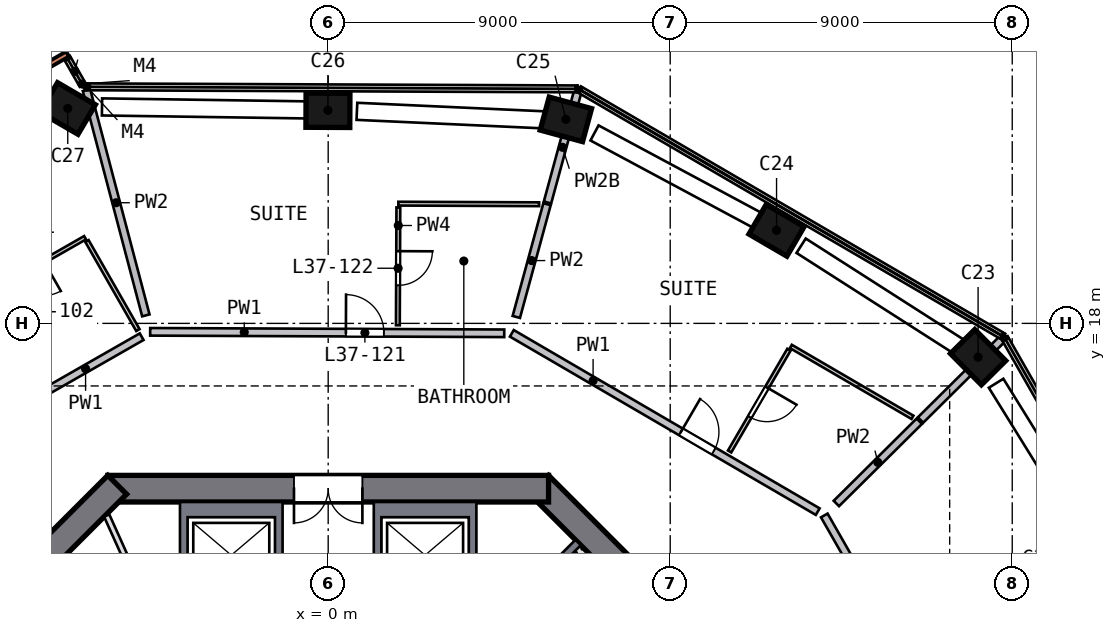
"""IFC4 building model, lengths in metres.
Left out: names, types, materials, properties, quantities, classifications, styles, units other than length and angle.
Written with IfcOpenShell. Run it as: python <this file> out.ifc"""

import sys

from ifc_helpers import new_model, si_unit, direction, frame, frame_2d, origin, origin_2d, place, context, subcontext, project, spatial, polyline, rectangle, outline, extrude, element, fill, save


model = new_model("IFC4")
c1 = context("Model", 3, precision=1e-05, world=origin(), true_north=direction((0.0, 1.0)))
c2 = subcontext(c1, "Body", "Model", "MODEL_VIEW")
j1 = project(units=[si_unit("LENGTHUNIT", "METRE"), si_unit("PLANEANGLEUNIT", "RADIAN")], contexts=[c1])
p1 = place(None, origin())
s1 = spatial("IfcSite", under=j1, at=p1, CompositionType="ELEMENT")
p2 = place(p1, origin())
s2 = spatial("IfcBuilding", under=s1, at=p2, CompositionType="ELEMENT")
p3 = place(p2, frame((0.0, 0.0, 154.0)))
s3 = spatial("IfcBuildingStorey", under=s2, at=p3, CompositionType="ELEMENT", Elevation=154.0)
p4 = place(p3, frame((17.178, 17.035, 0.0), z_axis=(-0.063662588, 0.063198321, 0.995968397), x_axis=(0.700878187, -0.707618105, 0.089701637)))
e1 = element("IfcColumn", 1, at=p4, inside=s3, PredefinedType="COLUMN", context=c2, shape_type="SweptSolid", body=[
    extrude(rectangle(XDim=1.15, YDim=0.9, at=origin_2d()), origin(), (0.0, 0.0, 1.0), 4.207),
])
p5 = place(p3, frame((11.89, 20.396, 0.0), z_axis=(-0.075980354, 0.04347539, 0.996161069), x_axis=(-0.860417708, 0.502014727, -0.087536174)))
e2 = element("IfcColumn", 2, at=p5, inside=s3, PredefinedType="COLUMN", context=c2, shape_type="SweptSolid", body=[
    extrude(rectangle(XDim=1.15, YDim=0.9, at=origin_2d()), origin(), (0.0, 0.0, 1.0), 4.206),
])
p6 = place(p3, frame((6.359, 23.342, 0.0), z_axis=(-0.086759726, 0.022865105, 0.995966835), x_axis=(0.960904851, -0.261939638, 0.08971897)))
e3 = element("IfcColumn", 3, at=p6, inside=s3, PredefinedType="COLUMN", context=c2, shape_type="SweptSolid", body=[
    extrude(rectangle(XDim=1.15, YDim=0.9, at=origin_2d()), origin(), (0.0, 0.0, 1.0), 4.207),
])
p7 = place(p3, frame((0.099, 23.608, 0.0), z_axis=(-0.087531282, -0.000348268, 0.99616171), x_axis=(-0.996152055, 0.004447239, -0.087528879)))
e4 = element("IfcColumn", 4, at=p7, inside=s3, PredefinedType="COLUMN", context=c2, shape_type="SweptSolid", body=[
    extrude(rectangle(XDim=1.15, YDim=0.9, at=origin_2d()), origin(), (0.0, 0.0, 1.0), 4.206),
])
p8 = place(p3, frame((-6.747, 23.687, 0.0), z_axis=(-0.087617394, -0.025762995, 0.995820998), x_axis=(0.860171436, -0.50615007, 0.062587591)))
e5 = element("IfcColumn", 5, at=p8, inside=s3, PredefinedType="COLUMN", context=c2, shape_type="SweptSolid", body=[
    extrude(rectangle(XDim=1.15, YDim=0.9, at=origin_2d()), origin(), (0.0, 0.0, 1.0), 4.208),
])
p9 = place(p3, frame((13.752, 5.552, 0.0), z_axis=(0.0, 0.0, 1.0), x_axis=(-0.707106781, 0.707106781, 0.0)))
e6 = element("IfcWall", 6, at=p9, inside=s3, PredefinedType="SHEAR", context=c2, shape_type="SweptSolid", body=[
    extrude(rectangle(XDim=11.598, YDim=0.7, at=frame_2d((5.799, 0.0))), origin(), (0.0, 0.0, 1.0), 4.5),
])
p10 = place(p9, frame((2.099, 0.0, 0.0)))
e7 = element("IfcOpeningElement", 7, at=p10, cuts=e6, PredefinedType="OPENING", context=c2, shape_type="SweptSolid", body=[
    extrude(rectangle(XDim=1.2, YDim=2.1, at=frame_2d((0.6, 1.05))), frame((0.0, 0.36, 0.0), z_axis=(0.0, -1.0, 0.0), x_axis=(1.0, 0.0, 0.0)), (0.0, 0.0, 1.0), 0.72),
])
p11 = place(p3, frame((5.799, 13.65, 0.0), z_axis=(0.0, 0.0, 1.0), x_axis=(-1.0, 0.0, 0.0)))
e8 = element("IfcWall", 8, at=p11, inside=s3, PredefinedType="SHEAR", context=c2, shape_type="SweptSolid", body=[
    extrude(rectangle(XDim=11.598, YDim=0.7, at=frame_2d((5.799, 0.0))), origin(), (0.0, 0.0, 1.0), 4.5),
])
p12 = place(p11, frame((4.899, 0.0, 0.0)))
e9 = element("IfcOpeningElement", 9, at=p12, cuts=e8, PredefinedType="OPENING", context=c2, shape_type="SweptSolid", body=[
    extrude(rectangle(XDim=1.8, YDim=2.1, at=frame_2d((0.9, 1.05))), frame((0.0, 0.36, 0.0), z_axis=(0.0, -1.0, 0.0), x_axis=(1.0, 0.0, 0.0)), (0.0, 0.0, 1.0), 0.72),
])
p13 = place(p3, frame((-5.552, 13.752, 0.0), z_axis=(0.0, 0.0, 1.0), x_axis=(-0.707106781, -0.707106781, 0.0)))
e10 = element("IfcWall", 10, at=p13, inside=s3, PredefinedType="SHEAR", context=c2, shape_type="SweptSolid", body=[
    extrude(rectangle(XDim=11.598, YDim=0.7, at=frame_2d((5.799, 0.0))), origin(), (0.0, 0.0, 1.0), 4.5),
])
p14 = place(p3, frame((-6.857, 25.088, 0.0), z_axis=(0.0, 0.0, 1.0), x_axis=(-0.868114906, -0.496363285, 0.0)))
e11 = element("IfcWall", 11, at=p14, inside=s3, PredefinedType="SOLIDWALL", context=c2, shape_type="SweptSolid", body=[
    extrude(rectangle(XDim=1.875, YDim=0.15, at=frame_2d((0.938, 0.0))), origin(), (0.0, 0.0, 1.0), 4.19),
])
p15 = place(p3, origin())
e12 = element("IfcWall", 12, at=p15, inside=s3, PredefinedType="SOLIDWALL", context=c2, shape_type="SweptSolid", body=[
    extrude(outline(polyline([(3.9, 13.3), (3.9, 10.9), (3.7, 10.9), (3.7, 12.9), (1.4, 12.9), (1.4, 10.9), (1.2, 10.9), (1.2, 13.3), (3.9, 13.3)])), origin(), (0.0, 0.0, 1.0), 4.19),
])
p16 = place(p3, origin())
e13 = element("IfcWall", 13, at=p16, inside=s3, PredefinedType="SOLIDWALL", context=c2, shape_type="SweptSolid", body=[
    extrude(outline(polyline([(-3.9, 10.9), (-3.9, 13.3), (-1.2, 13.3), (-1.2, 10.9), (-1.4, 10.9), (-1.4, 12.9), (-3.7, 12.9), (-3.7, 10.9), (-3.9, 10.9)])), origin(), (0.0, 0.0, 1.0), 4.19),
])
p17 = place(p3, frame((3.677, 9.334, 0.0), z_axis=(0.0, 0.0, 1.0), x_axis=(0.707106781, 0.707106781, 0.0)))
e14 = element("IfcWall", 14, at=p17, inside=s3, PredefinedType="SOLIDWALL", context=c2, shape_type="SweptSolid", body=[
    extrude(rectangle(XDim=4.1, YDim=0.2, at=frame_2d((2.05, 0.0))), origin(), (0.0, 0.0, 1.0), 4.19),
])
p18 = place(p3, frame((-5.828, 12.942, 0.0), z_axis=(0.0, 0.0, 1.0), x_axis=(0.410577476, -0.911825716, 0.0)))
e15 = element("IfcWall", 15, at=p18, inside=s3, PredefinedType="PARTITIONING", context=c2, shape_type="SweptSolid", body=[
    extrude(rectangle(XDim=9.063, YDim=0.15, at=frame_2d((4.532, 0.0))), origin(), (0.0, 0.0, 1.0), 4.19),
])
p19 = place(p18, frame((3.463, 0.0, 0.0)))
e16 = element("IfcOpeningElement", 16, at=p19, cuts=e15, PredefinedType="OPENING", context=c2, shape_type="SweptSolid", body=[
    extrude(rectangle(XDim=1.8, YDim=2.1, at=frame_2d((0.9, 1.05))), frame((0.0, 0.085, 0.0), z_axis=(0.0, -1.0, 0.0), x_axis=(1.0, 0.0, 0.0)), (0.0, 0.0, 1.0), 0.17),
])
p20 = place(p3, frame((-4.908, 17.65, 0.0), z_axis=(0.0, 0.0, 1.0), x_axis=(-0.86811938, -0.49635546, 0.0)))
e17 = element("IfcWall", 17, at=p20, inside=s3, PredefinedType="SOLIDWALL", context=c2, shape_type="SweptSolid", body=[
    extrude(rectangle(XDim=3.4, YDim=0.2, at=frame_2d((1.7, 0.0))), origin(), (0.0, 0.0, 1.0), 4.19),
])
p21 = place(p3, frame((-4.684, 17.778, 0.0), z_axis=(0.0, 0.0, 1.0), x_axis=(0.99999121, -0.004192835, 0.0)))
e18 = element("IfcWall", 18, at=p21, inside=s3, PredefinedType="SOLIDWALL", context=c2, shape_type="SweptSolid", body=[
    extrude(rectangle(XDim=9.316, YDim=0.2, at=frame_2d((4.658, 0.0))), origin(), (0.0, 0.0, 1.0), 4.19),
])
p22 = place(p21, frame((5.15, 0.0, 0.0)))
e19 = element("IfcOpeningElement", 19, at=p22, cuts=e18, PredefinedType="OPENING", context=c2, shape_type="SweptSolid", body=[
    extrude(rectangle(XDim=1.0, YDim=2.1, at=frame_2d((0.5, 1.05))), frame((0.0, 0.11, 0.0), z_axis=(0.0, -1.0, 0.0), x_axis=(1.0, 0.0, 0.0)), (0.0, 0.0, 1.0), 0.22),
])
p23 = place(p3, frame((4.833, 17.738, 0.0), z_axis=(0.0, 0.0, 1.0), x_axis=(0.863919531, -0.503629868, 0.0)))
e20 = element("IfcWall", 20, at=p23, inside=s3, PredefinedType="SOLIDWALL", context=c2, shape_type="SweptSolid", body=[
    extrude(rectangle(XDim=9.317, YDim=0.2, at=frame_2d((4.658, 0.0))), origin(), (0.0, 0.0, 1.0), 4.19),
])
p24 = place(p23, frame((5.15, 0.0, 0.0)))
e21 = element("IfcOpeningElement", 21, at=p24, cuts=e20, PredefinedType="OPENING", context=c2, shape_type="SweptSolid", body=[
    extrude(rectangle(XDim=1.0, YDim=2.1, at=frame_2d((0.5, 1.05))), frame((0.0, 0.11, 0.0), z_axis=(0.0, -1.0, 0.0), x_axis=(1.0, 0.0, 0.0)), (0.0, 0.0, 1.0), 0.22),
])
p25 = place(p3, frame((13.054, 12.945, 0.0), z_axis=(0.0, 0.0, 1.0), x_axis=(0.496359944, -0.868116816, 0.0)))
e22 = element("IfcWall", 22, at=p25, inside=s3, PredefinedType="SOLIDWALL", context=c2, shape_type="SweptSolid", body=[
    extrude(rectangle(XDim=9.517, YDim=0.2, at=frame_2d((4.758, 0.0))), origin(), (0.0, 0.0, 1.0), 4.19),
])
p26 = place(p25, frame((6.25, 0.0, 0.0)))
e23 = element("IfcOpeningElement", 23, at=p26, cuts=e22, PredefinedType="OPENING", context=c2, shape_type="SweptSolid", body=[
    extrude(rectangle(XDim=1.8, YDim=2.1, at=frame_2d((0.9, 1.05))), frame((0.0, 0.11, 0.0), z_axis=(0.0, -1.0, 0.0), x_axis=(1.0, 0.0, 0.0)), (0.0, 0.0, 1.0), 0.22),
])
p27 = place(p3, frame((-6.36, 24.14, 0.0), z_axis=(0.0, 0.0, 1.0), x_axis=(0.254769614, -0.967001781, 0.0)))
e24 = element("IfcWall", 24, at=p27, inside=s3, PredefinedType="SOLIDWALL", context=c2, shape_type="SweptSolid", body=[
    extrude(rectangle(XDim=6.132, YDim=0.2, at=frame_2d((3.066, 0.0))), origin(), (0.0, 0.0, 1.0), 4.19),
])
p28 = place(p3, frame((4.95, 18.17, 0.0), z_axis=(0.0, 0.0, 1.0), x_axis=(0.262922543, 0.964816944, 0.0)))
e25 = element("IfcWall", 25, at=p28, inside=s3, PredefinedType="SOLIDWALL", context=c2, shape_type="SweptSolid", body=[
    extrude(rectangle(XDim=3.074, YDim=0.2, at=frame_2d((1.537, 0.0))), origin(), (0.0, 0.0, 1.0), 4.19),
])
p29 = place(p3, frame((5.771, 21.181, 0.0), z_axis=(0.0, 0.0, 1.0), x_axis=(0.262836136, 0.964840487, 0.0)))
e26 = element("IfcWall", 26, at=p29, inside=s3, PredefinedType="SOLIDWALL", context=c2, shape_type="SweptSolid", body=[
    extrude(rectangle(XDim=3.011, YDim=0.2, at=frame_2d((1.506, 0.0))), origin(), (0.0, 0.0, 1.0), 3.69),
])
p30 = place(p3, frame((13.372, 13.26, 0.0), z_axis=(0.0, 0.0, 1.0), x_axis=(0.710117728, 0.704082958, 0.0)))
e27 = element("IfcWall", 27, at=p30, inside=s3, PredefinedType="SOLIDWALL", context=c2, shape_type="SweptSolid", body=[
    extrude(rectangle(XDim=3.075, YDim=0.2, at=frame_2d((1.537, 0.0))), origin(), (0.0, 0.0, 1.0), 4.19),
])
p31 = place(p3, frame((15.588, 15.458, 0.0), z_axis=(0.0, 0.0, 1.0), x_axis=(0.710100042, 0.704100795, 0.0)))
e28 = element("IfcWall", 28, at=p31, inside=s3, PredefinedType="SOLIDWALL", context=c2, shape_type="SweptSolid", body=[
    extrude(rectangle(XDim=3.011, YDim=0.2, at=frame_2d((1.506, 0.0))), origin(), (0.0, 0.0, 1.0), 4.19),
])
p32 = place(p3, frame((-6.397, 20.254, 0.0), z_axis=(0.0, 0.0, 1.0), x_axis=(-0.868121049, -0.49635254, 0.0)))
e29 = element("IfcWall", 29, at=p32, inside=s3, PredefinedType="PARTITIONING", context=c2, shape_type="SweptSolid", body=[
    extrude(rectangle(XDim=3.2, YDim=0.1, at=frame_2d((1.6, 0.0))), origin(), (0.0, 0.0, 1.0), 4.19),
])
p33 = place(p32, frame((1.25, 0.0, 0.0)))
e30 = element("IfcOpeningElement", 30, at=p33, cuts=e29, PredefinedType="OPENING", context=c2, shape_type="SweptSolid", body=[
    extrude(rectangle(XDim=0.9, YDim=2.1, at=frame_2d((0.45, 1.05))), frame((0.0, 0.06, 0.0), z_axis=(0.0, -1.0, 0.0), x_axis=(1.0, 0.0, 0.0)), (0.0, 0.0, 1.0), 0.12),
])
p34 = place(p3, frame((-6.348, 20.167, 0.0), z_axis=(0.0, 0.0, 1.0), x_axis=(0.496392086, -0.868098437, 0.0)))
e31 = element("IfcWall", 31, at=p34, inside=s3, PredefinedType="PARTITIONING", context=c2, shape_type="SweptSolid", body=[
    extrude(rectangle(XDim=2.7, YDim=0.1, at=frame_2d((1.35, 0.0))), origin(), (0.0, 0.0, 1.0), 4.19),
])
p35 = place(p3, frame((1.846, 21.051, 0.0), z_axis=(0.0, 0.0, 1.0), x_axis=(-0.004173849, -0.999991289, 0.0)))
e32 = element("IfcWall", 32, at=p35, inside=s3, PredefinedType="PARTITIONING", context=c2, shape_type="SweptSolid", body=[
    extrude(rectangle(XDim=3.1, YDim=0.1, at=frame_2d((1.55, 0.0))), origin(), (0.0, 0.0, 1.0), 4.19),
])
p36 = place(p35, frame((1.15, 0.0, 0.0)))
e33 = element("IfcOpeningElement", 33, at=p36, cuts=e32, PredefinedType="OPENING", context=c2, shape_type="SweptSolid", body=[
    extrude(rectangle(XDim=0.9, YDim=2.1, at=frame_2d((0.45, 1.05))), frame((0.0, 0.06, 0.0), z_axis=(0.0, -1.0, 0.0), x_axis=(1.0, 0.0, 0.0)), (0.0, 0.0, 1.0), 0.12),
])
p37 = place(p3, frame((1.847, 21.151, 0.0), z_axis=(0.0, 0.0, 1.0), x_axis=(0.999991102, -0.004218537, 0.0)))
e34 = element("IfcWall", 34, at=p37, inside=s3, PredefinedType="PARTITIONING", context=c2, shape_type="SweptSolid", body=[
    extrude(rectangle(XDim=3.704, YDim=0.1, at=frame_2d((1.852, 0.0))), origin(), (0.0, 0.0, 1.0), 4.19),
])
p38 = place(p3, frame((12.125, 17.307, 0.0), z_axis=(0.0, 0.0, 1.0), x_axis=(-0.503660444, -0.863901706, 0.0)))
e35 = element("IfcWall", 35, at=p38, inside=s3, PredefinedType="PARTITIONING", context=c2, shape_type="SweptSolid", body=[
    extrude(rectangle(XDim=3.1, YDim=0.1, at=frame_2d((1.55, 0.0))), origin(), (0.0, 0.0, 1.0), 4.19),
])
p39 = place(p38, frame((1.15, 0.0, 0.0)))
e36 = element("IfcOpeningElement", 36, at=p39, cuts=e35, PredefinedType="OPENING", context=c2, shape_type="SweptSolid", body=[
    extrude(rectangle(XDim=0.9, YDim=2.1, at=frame_2d((0.45, 1.05))), frame((0.0, 0.06, 0.0), z_axis=(0.0, -1.0, 0.0), x_axis=(1.0, 0.0, 0.0)), (0.0, 0.0, 1.0), 0.12),
])
p40 = place(p3, frame((12.175, 17.394, 0.0), z_axis=(0.0, 0.0, 1.0), x_axis=(0.863943812, -0.503588214, 0.0)))
e37 = element("IfcWall", 37, at=p40, inside=s3, PredefinedType="PARTITIONING", context=c2, shape_type="SweptSolid", body=[
    extrude(rectangle(XDim=3.704, YDim=0.1, at=frame_2d((1.852, 0.0))), origin(), (0.0, 0.0, 1.0), 4.19),
])
p41 = place(p12, origin())
e38 = element("IfcDoor", 38, at=p41, inside=s3, OperationType="DOUBLE_DOOR_SINGLE_SWING", PredefinedType="DOOR", context=c2, shape_type="SweptSolid", body=[
    extrude(rectangle(XDim=1.8, YDim=2.1, at=frame_2d((0.9, 1.05))), frame((0.0, 0.025, 0.0), z_axis=(0.0, -1.0, 0.0), x_axis=(1.0, 0.0, 0.0)), (0.0, 0.0, 1.0), 0.05),
])
fill(e9, e38)
p42 = place(p24, origin())
e39 = element("IfcDoor", 39, at=p42, inside=s3, OperationType="SINGLE_SWING_LEFT", PredefinedType="DOOR", context=c2, shape_type="SweptSolid", body=[
    extrude(rectangle(XDim=1.0, YDim=2.1, at=frame_2d((0.5, 1.05))), frame((0.0, 0.025, 0.0), z_axis=(0.0, -1.0, 0.0), x_axis=(1.0, 0.0, 0.0)), (0.0, 0.0, 1.0), 0.05),
])
fill(e21, e39)
p43 = place(p39, origin())
e40 = element("IfcDoor", 40, at=p43, inside=s3, OperationType="SINGLE_SWING_LEFT", PredefinedType="DOOR", context=c2, shape_type="SweptSolid", body=[
    extrude(rectangle(XDim=0.9, YDim=2.1, at=frame_2d((0.45, 1.05))), frame((0.0, 0.025, 0.0), z_axis=(0.0, -1.0, 0.0), x_axis=(1.0, 0.0, 0.0)), (0.0, 0.0, 1.0), 0.05),
])
fill(e36, e40)
p44 = place(p22, origin())
e41 = element("IfcDoor", 41, at=p44, inside=s3, OperationType="SINGLE_SWING_LEFT", PredefinedType="DOOR", context=c2, shape_type="SweptSolid", body=[
    extrude(rectangle(XDim=1.0, YDim=2.1, at=frame_2d((0.5, 1.05))), frame((0.0, 0.025, 0.0), z_axis=(0.0, -1.0, 0.0), x_axis=(1.0, 0.0, 0.0)), (0.0, 0.0, 1.0), 0.05),
])
fill(e19, e41)
p45 = place(p36, origin())
e42 = element("IfcDoor", 42, at=p45, inside=s3, OperationType="SINGLE_SWING_LEFT", PredefinedType="DOOR", context=c2, shape_type="SweptSolid", body=[
    extrude(rectangle(XDim=0.9, YDim=2.1, at=frame_2d((0.45, 1.05))), frame((0.0, 0.025, 0.0), z_axis=(0.0, -1.0, 0.0), x_axis=(1.0, 0.0, 0.0)), (0.0, 0.0, 1.0), 0.05),
])
fill(e33, e42)
save(model, sys.argv[1])
